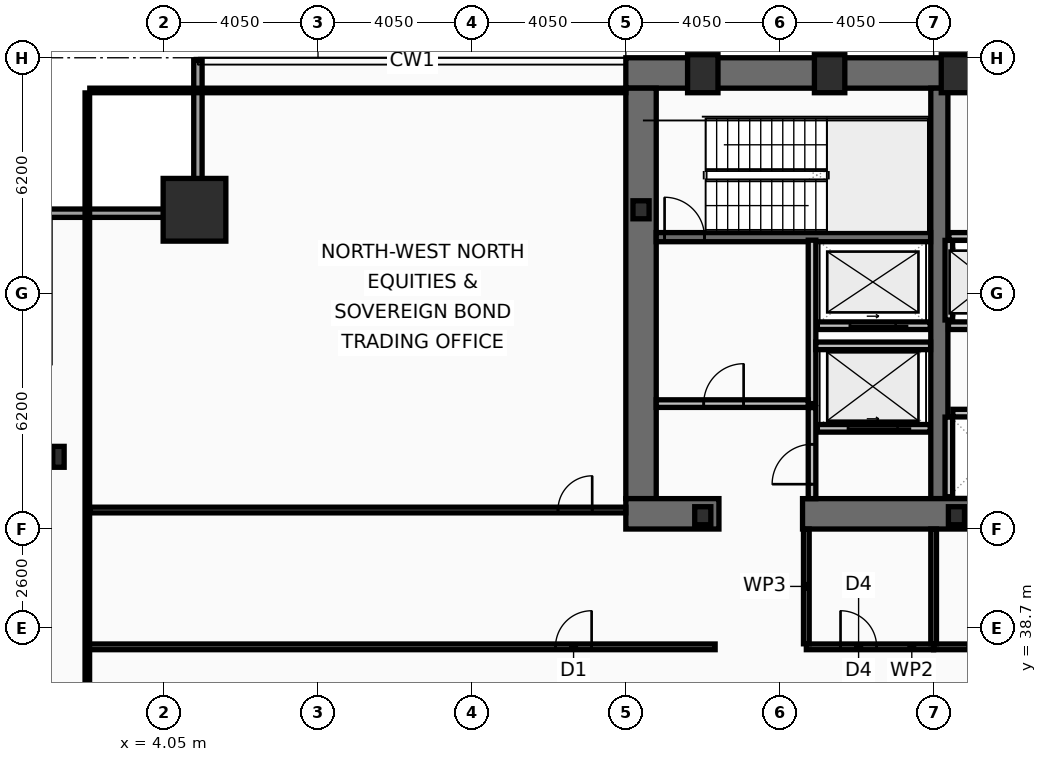
"""IFC4 building model, lengths in metres.
Left out: names, types, materials, properties, quantities, classifications, styles, units other than length and angle.
Written with IfcOpenShell. Run it as: python <this file> out.ifc"""

import sys

from ifc_helpers import new_model, si_unit, direction, frame, frame_2d, origin, origin_2d, place, context, subcontext, project, spatial, rectangle, hollow_rectangle, i_section, extrude, element, fill, save


model = new_model("IFC4")
c1 = context("Model", 3, precision=1e-05, world=origin(), true_north=direction((0.0, 1.0)))
c2 = subcontext(c1, "Body", "Model", "MODEL_VIEW")
j1 = project(units=[si_unit("LENGTHUNIT", "METRE"), si_unit("PLANEANGLEUNIT", "RADIAN")], contexts=[c1])
p1 = place(None, origin())
s1 = spatial("IfcSite", under=j1, at=p1, CompositionType="ELEMENT")
p2 = place(p1, origin())
s2 = spatial("IfcBuilding", under=s1, at=p2, CompositionType="ELEMENT")
p3 = place(p2, frame((0.0, 0.0, 25.8)))
s3 = spatial("IfcBuildingStorey", under=s2, at=p3, CompositionType="ELEMENT", Elevation=25.8)
p4 = place(p3, frame((16.2, 53.3, 0.0), z_axis=(0.0, 0.0, 1.0), x_axis=(1.0, 0.0, 0.0)))
e1 = element("IfcWall", 1, at=p4, inside=s3, PredefinedType="SHEAR", context=c2, shape_type="SweptSolid", body=[
    extrude(rectangle(XDim=40.5, YDim=0.8, at=frame_2d((20.25, 0.0))), origin(), (0.0, 0.0, 1.0), 3.82),
])
p5 = place(p3, frame((16.6, 42.1, 0.0), z_axis=(0.0, 0.0, 1.0), x_axis=(0.0, 1.0, 0.0)))
e2 = element("IfcWall", 2, at=p5, inside=s3, PredefinedType="SHEAR", context=c2, shape_type="SweptSolid", body=[
    extrude(rectangle(XDim=10.8, YDim=0.8, at=frame_2d((5.4, 0.0))), origin(), (0.0, 0.0, 1.0), 3.82),
])
p6 = place(p3, frame((24.45, 42.1, 0.0), z_axis=(0.0, 0.0, 1.0), x_axis=(0.0, 1.0, 0.0)))
e3 = element("IfcWall", 3, at=p6, inside=s3, PredefinedType="SHEAR", context=c2, shape_type="SweptSolid", body=[
    extrude(rectangle(XDim=10.8, YDim=0.45, at=frame_2d((5.4, 0.0))), origin(), (0.0, 0.0, 1.0), 3.82),
])
p7 = place(p3, frame((18.65, 41.7, 0.0), z_axis=(0.0, 0.0, 1.0), x_axis=(-1.0, 0.0, 0.0)))
e4 = element("IfcWall", 4, at=p7, inside=s3, PredefinedType="SHEAR", context=c2, shape_type="SweptSolid", body=[
    extrude(rectangle(XDim=2.45, YDim=0.8, at=frame_2d((1.225, 0.0))), origin(), (0.0, 0.0, 1.0), 3.82),
])
p8 = place(p3, frame((32.3, 41.7, 0.0), z_axis=(0.0, 0.0, 1.0), x_axis=(-1.0, 0.0, 0.0)))
e5 = element("IfcWall", 5, at=p8, inside=s3, PredefinedType="SHEAR", context=c2, shape_type="SweptSolid", body=[
    extrude(rectangle(XDim=11.45, YDim=0.8, at=frame_2d((5.725, 0.0))), origin(), (0.0, 0.0, 1.0), 3.82),
])
p9 = place(p3, frame((17.0, 48.98, 0.0), z_axis=(0.0, 0.0, 1.0), x_axis=(1.0, 0.0, 0.0)))
e6 = element("IfcWall", 6, at=p9, inside=s3, PredefinedType="SHEAR", context=c2, shape_type="SweptSolid", body=[
    extrude(rectangle(XDim=7.22, YDim=0.24, at=frame_2d((3.61, 0.0))), origin(), (0.0, 0.0, 1.0), 3.82),
])
p10 = place(p9, frame((0.22, 0.0, 0.0)))
e7 = element("IfcOpeningElement", 7, at=p10, cuts=e6, PredefinedType="OPENING", context=c2, shape_type="SweptSolid", body=[
    extrude(rectangle(XDim=1.05, YDim=2.15, at=frame_2d((0.525, 1.075))), frame((0.0, 0.13, 0.0), z_axis=(0.0, -1.0, 0.0), x_axis=(1.0, 0.0, 0.0)), (0.0, 0.0, 1.0), 0.26),
])
p11 = place(p3, frame((4.85, 49.7, 0.0), z_axis=(0.0, 0.0, 1.0), x_axis=(1.0, 0.0, 0.0)))
e8 = element("IfcColumn", 8, at=p11, inside=s3, PredefinedType="COLUMN", context=c2, shape_type="SweptSolid", body=[
    extrude(hollow_rectangle(XDim=1.65, YDim=1.65, WallThickness=0.075, at=origin_2d()), origin(), (0.0, 0.0, 1.0), 4.0),
])
for number, where, z_axis, x_axis in (
    (9, (18.225, 53.28, 0.0), (0.0, 0.0, 1.0), (1.0, 0.0, 0.0)),
    (10, (21.562, 53.28, 0.0), (0.0, 0.0, 1.0), (1.0, 0.0, 0.0)),
    (11, (24.9, 53.28, 0.0), (0.0, 0.0, 1.0), (1.0, 0.0, 0.0)),
):
    element("IfcColumn", number, at=place(p3, frame(where, z_axis=z_axis, x_axis=x_axis)), inside=s3, PredefinedType="COLUMN", context=c2, shape_type="SweptSolid", body=[
        extrude(hollow_rectangle(XDim=0.8, YDim=1.0, WallThickness=0.055, at=origin_2d()), origin(), (0.0, 0.0, 1.0), 4.0),
    ])
p12 = place(p3, frame((1.27, 43.2, 0.0), z_axis=(0.0, 0.0, 1.0), x_axis=(1.0, 0.0, 0.0)))
e12 = element("IfcColumn", 12, at=p12, inside=s3, PredefinedType="COLUMN", context=c2, shape_type="SweptSolid", body=[
    extrude(i_section(OverallWidth=0.3, OverallDepth=0.55, WebThickness=0.015, FlangeThickness=0.029, at=origin_2d()), origin(), (0.0, 0.0, 1.0), 4.0),
])
for number, where, z_axis, x_axis in (
    (13, (16.6, 49.7, 0.0), (0.0, 0.0, 1.0), (1.0, 0.0, 0.0)),
    (14, (18.225, 41.65, 0.0), (0.0, 0.0, 1.0), (1.0, 0.0, 0.0)),
    (15, (24.9, 41.65, 0.0), (0.0, 0.0, 1.0), (1.0, 0.0, 0.0)),
):
    element("IfcColumn", number, at=place(p3, frame(where, z_axis=z_axis, x_axis=x_axis)), inside=s3, PredefinedType="COLUMN", context=c2, shape_type="SweptSolid", body=[
        extrude(i_section(OverallWidth=0.424, OverallDepth=0.474, WebThickness=0.048, FlangeThickness=0.077, at=origin_2d()), origin(), (0.0, 0.0, 1.0), 4.0),
    ])
p13 = place(p3, frame((0.83, 49.61, 0.0), z_axis=(0.0, 0.0, 1.0), x_axis=(1.0, 0.0, 0.0)))
e16 = element("IfcWall", 16, at=p13, inside=s3, PredefinedType="SOLIDWALL", context=c2, shape_type="SweptSolid", body=[
    extrude(rectangle(XDim=4.22, YDim=0.22, at=frame_2d((2.11, 0.0))), origin(), (0.0, 0.0, 1.0), 3.16),
])
p14 = place(p3, frame((4.94, 49.72, 0.0), z_axis=(0.0, 0.0, 1.0), x_axis=(0.0, 1.0, 0.0)))
e17 = element("IfcWall", 17, at=p14, inside=s3, PredefinedType="SOLIDWALL", context=c2, shape_type="SweptSolid", body=[
    extrude(rectangle(XDim=3.91, YDim=0.22, at=frame_2d((1.955, 0.0))), origin(), (0.0, 0.0, 1.0), 3.16),
])
p15 = place(p3, frame((24.21, 43.95, 0.0), z_axis=(0.0, 0.0, 1.0), x_axis=(-1.0, 0.0, 0.0)))
e18 = element("IfcWall", 18, at=p15, inside=s3, PredefinedType="PARTITIONING", context=c2, shape_type="SweptSolid", body=[
    extrude(rectangle(XDim=2.97, YDim=0.2, at=frame_2d((1.485, 0.0))), origin(), (0.0, 0.0, 1.0), 3.82),
])
p16 = place(p15, frame((0.86, 0.0, 0.0)))
e19 = element("IfcOpeningElement", 19, at=p16, cuts=e18, PredefinedType="OPENING", context=c2, shape_type="SweptSolid", body=[
    extrude(rectangle(XDim=1.3, YDim=2.18, at=frame_2d((0.65, 1.09))), frame((0.0, 0.11, 0.0), z_axis=(0.0, -1.0, 0.0), x_axis=(1.0, 0.0, 0.0)), (0.0, 0.0, 1.0), 0.22),
])
p17 = place(p3, frame((24.21, 46.65, 0.0), z_axis=(0.0, 0.0, 1.0), x_axis=(-1.0, 0.0, 0.0)))
e20 = element("IfcWall", 20, at=p17, inside=s3, PredefinedType="PARTITIONING", context=c2, shape_type="SweptSolid", body=[
    extrude(rectangle(XDim=2.97, YDim=0.2, at=frame_2d((1.485, 0.0))), origin(), (0.0, 0.0, 1.0), 3.82),
])
p18 = place(p17, frame((0.91, 0.0, 0.0)))
e21 = element("IfcOpeningElement", 21, at=p18, cuts=e20, PredefinedType="OPENING", context=c2, shape_type="SweptSolid", body=[
    extrude(rectangle(XDim=1.2, YDim=2.18, at=frame_2d((0.6, 1.09))), frame((0.0, 0.11, 0.0), z_axis=(0.0, -1.0, 0.0), x_axis=(1.0, 0.0, 0.0)), (0.0, 0.0, 1.0), 0.22),
])
p19 = place(p3, frame((31.22, 46.65, 0.0), z_axis=(0.0, 0.0, 1.0), x_axis=(-1.0, 0.0, 0.0)))
e22 = element("IfcWall", 22, at=p19, inside=s3, PredefinedType="PARTITIONING", context=c2, shape_type="SweptSolid", body=[
    extrude(rectangle(XDim=6.53, YDim=0.2, at=frame_2d((3.265, 0.0))), origin(), (0.0, 0.0, 1.0), 3.82),
])
p20 = place(p19, frame((4.9, 0.0, 0.0)))
e23 = element("IfcOpeningElement", 23, at=p20, cuts=e22, PredefinedType="OPENING", context=c2, shape_type="SweptSolid", body=[
    extrude(rectangle(XDim=1.1, YDim=2.18, at=frame_2d((0.55, 1.09))), frame((0.0, 0.11, 0.0), z_axis=(0.0, -1.0, 0.0), x_axis=(1.0, 0.0, 0.0)), (0.0, 0.0, 1.0), 0.22),
])
p21 = place(p19, frame((2.74, 0.0, 0.0)))
e24 = element("IfcOpeningElement", 24, at=p21, cuts=e22, PredefinedType="OPENING", context=c2, shape_type="SweptSolid", body=[
    extrude(rectangle(XDim=1.1, YDim=2.18, at=frame_2d((0.55, 1.09))), frame((0.0, 0.11, 0.0), z_axis=(0.0, -1.0, 0.0), x_axis=(1.0, 0.0, 0.0)), (0.0, 0.0, 1.0), 0.22),
])
p22 = place(p19, frame((0.58, 0.0, 0.0)))
e25 = element("IfcOpeningElement", 25, at=p22, cuts=e22, PredefinedType="OPENING", context=c2, shape_type="SweptSolid", body=[
    extrude(rectangle(XDim=1.1, YDim=2.18, at=frame_2d((0.55, 1.09))), frame((0.0, 0.11, 0.0), z_axis=(0.0, -1.0, 0.0), x_axis=(1.0, 0.0, 0.0)), (0.0, 0.0, 1.0), 0.22),
])
p23 = place(p3, frame((21.1, 44.6, 0.0), z_axis=(0.0, 0.0, 1.0), x_axis=(0.0, 1.0, 0.0)))
e26 = element("IfcWall", 26, at=p23, inside=s3, PredefinedType="PARTITIONING", context=c2, shape_type="SweptSolid", body=[
    extrude(rectangle(XDim=4.3, YDim=0.2, at=frame_2d((2.15, 0.0))), origin(), (0.0, 0.0, 1.0), 3.82),
])
p24 = place(p3, frame((17.0, 44.6, 0.0), z_axis=(0.0, 0.0, 1.0), x_axis=(1.0, 0.0, 0.0)))
e27 = element("IfcWall", 27, at=p24, inside=s3, PredefinedType="PARTITIONING", context=c2, shape_type="SweptSolid", body=[
    extrude(rectangle(XDim=4.0, YDim=0.2, at=frame_2d((2.0, 0.0))), origin(), (0.0, 0.0, 1.0), 3.82),
])
p25 = place(p24, frame((1.25, 0.0, 0.0)))
e28 = element("IfcOpeningElement", 28, at=p25, cuts=e27, PredefinedType="OPENING", context=c2, shape_type="SweptSolid", body=[
    extrude(rectangle(XDim=1.05, YDim=2.15, at=frame_2d((0.525, 1.075))), frame((0.0, 0.11, 0.0), z_axis=(0.0, -1.0, 0.0), x_axis=(1.0, 0.0, 0.0)), (0.0, 0.0, 1.0), 0.22),
])
p26 = place(p3, frame((21.2, 46.12, 0.0), z_axis=(0.0, 0.0, 1.0), x_axis=(1.0, 0.0, 0.0)))
e29 = element("IfcWall", 29, at=p26, inside=s3, PredefinedType="PARTITIONING", context=c2, shape_type="SweptSolid", body=[
    extrude(rectangle(XDim=3.02, YDim=0.2, at=frame_2d((1.51, 0.0))), origin(), (0.0, 0.0, 1.0), 3.82),
])
p27 = place(p3, frame((21.1, 42.1, 0.0), z_axis=(0.0, 0.0, 1.0), x_axis=(0.0, 1.0, 0.0)))
e30 = element("IfcWall", 30, at=p27, inside=s3, PredefinedType="PARTITIONING", context=c2, shape_type="SweptSolid", body=[
    extrude(rectangle(XDim=2.395, YDim=0.2, at=frame_2d((1.198, 0.0))), origin(), (0.0, 0.0, 1.0), 3.82),
])
p28 = place(p27, frame((0.38, 0.0, 0.0)))
e31 = element("IfcOpeningElement", 31, at=p28, cuts=e30, PredefinedType="OPENING", context=c2, shape_type="SweptSolid", body=[
    extrude(rectangle(XDim=1.05, YDim=2.15, at=frame_2d((0.525, 1.075))), frame((0.0, 0.11, 0.0), z_axis=(0.0, -1.0, 0.0), x_axis=(1.0, 0.0, 0.0)), (0.0, 0.0, 1.0), 0.22),
])
p29 = place(p3, frame((24.7, 46.8, 0.0), z_axis=(0.0, 0.0, 1.0), x_axis=(0.0, 1.0, 0.0)))
e32 = element("IfcWall", 32, at=p29, inside=s3, PredefinedType="PARTITIONING", context=c2, shape_type="SweptSolid", body=[
    extrude(rectangle(XDim=2.095, YDim=0.2, at=frame_2d((1.047, 0.0))), origin(), (0.0, 0.0, 1.0), 3.82),
])
p30 = place(p3, frame((24.805, 44.35, 0.0), z_axis=(0.0, 0.0, 1.0), x_axis=(1.0, 0.0, 0.0)))
e33 = element("IfcWall", 33, at=p30, inside=s3, PredefinedType="PARTITIONING", context=c2, shape_type="SweptSolid", body=[
    extrude(rectangle(XDim=6.27, YDim=0.2, at=frame_2d((3.135, 0.0))), origin(), (0.0, 0.0, 1.0), 3.82),
])
p31 = place(p3, frame((24.7, 42.15, 0.0), z_axis=(0.0, 0.0, 1.0), x_axis=(0.0, 1.0, 0.0)))
e34 = element("IfcWall", 34, at=p31, inside=s3, PredefinedType="PARTITIONING", context=c2, shape_type="SweptSolid", body=[
    extrude(rectangle(XDim=2.095, YDim=0.2, at=frame_2d((1.048, 0.0))), origin(), (0.0, 0.0, 1.0), 3.82),
])
p32 = place(p3, frame((24.7, 52.86, 0.0), z_axis=(0.0, 0.0, 1.0), x_axis=(1.0, 0.0, 0.0)))
e35 = element("IfcWall", 35, at=p32, inside=s3, PredefinedType="PARTITIONING", context=c2, shape_type="SweptSolid", body=[
    extrude(rectangle(XDim=7.72, YDim=0.12, at=frame_2d((3.86, 0.0))), origin(), (0.0, 0.0, 1.0), 3.82),
])
p33 = place(p3, frame((24.7, 49.0, 0.0), z_axis=(0.0, 0.0, 1.0), x_axis=(1.0, 0.0, 0.0)))
e36 = element("IfcWall", 36, at=p33, inside=s3, PredefinedType="PARTITIONING", context=c2, shape_type="SweptSolid", body=[
    extrude(rectangle(XDim=7.72, YDim=0.2, at=frame_2d((3.86, 0.0))), origin(), (0.0, 0.0, 1.0), 3.82),
])
p34 = place(p33, frame((6.56, 0.0, 0.0)))
e37 = element("IfcOpeningElement", 37, at=p34, cuts=e36, PredefinedType="OPENING", context=c2, shape_type="SweptSolid", body=[
    extrude(rectangle(XDim=0.95, YDim=2.1, at=frame_2d((0.475, 1.05))), frame((0.0, 0.11, 0.0), z_axis=(0.0, -1.0, 0.0), x_axis=(1.0, 0.0, 0.0)), (0.0, 0.0, 1.0), 0.22),
])
p35 = place(p3, frame((20.95, 38.2, 0.0), z_axis=(0.0, 0.0, 1.0), x_axis=(1.0, 0.0, 0.0)))
e38 = element("IfcWall", 38, at=p35, inside=s3, PredefinedType="PARTITIONING", context=c2, shape_type="SweptSolid", body=[
    extrude(rectangle(XDim=3.35, YDim=0.15, at=frame_2d((1.675, 0.0))), origin(), (0.0, 0.0, 1.0), 3.82),
])
p36 = place(p35, frame((0.9, 0.0, 0.0)))
e39 = element("IfcOpeningElement", 39, at=p36, cuts=e38, PredefinedType="OPENING", context=c2, shape_type="SweptSolid", body=[
    extrude(rectangle(XDim=0.95, YDim=2.05, at=frame_2d((0.475, 1.025))), frame((0.0, 0.085, 0.0), z_axis=(0.0, -1.0, 0.0), x_axis=(1.0, 0.0, 0.0)), (0.0, 0.0, 1.0), 0.17),
])
p37 = place(p3, frame((24.3, 38.2, 0.0), z_axis=(0.0, 0.0, 1.0), x_axis=(1.0, 0.0, 0.0)))
e40 = element("IfcWall", 40, at=p37, inside=s3, PredefinedType="PARTITIONING", context=c2, shape_type="SweptSolid", body=[
    extrude(rectangle(XDim=4.1, YDim=0.15, at=frame_2d((2.05, 0.0))), origin(), (0.0, 0.0, 1.0), 3.01),
])
p38 = place(p37, frame((0.9, 0.0, 0.0)))
e41 = element("IfcOpeningElement", 41, at=p38, cuts=e40, PredefinedType="OPENING", context=c2, shape_type="SweptSolid", body=[
    extrude(rectangle(XDim=0.95, YDim=2.05, at=frame_2d((0.475, 1.025))), frame((0.0, 0.085, 0.0), z_axis=(0.0, -1.0, 0.0), x_axis=(1.0, 0.0, 0.0)), (0.0, 0.0, 1.0), 0.17),
])
for number, where, z_axis, x_axis in (
    (42, (20.95, 38.28, 0.0), (0.0, 0.0, 1.0), (0.0, 1.0, 0.0)),
    (43, (24.3, 38.28, 0.0), (0.0, 0.0, 1.0), (0.0, 1.0, 0.0)),
):
    element("IfcWall", number, at=place(p3, frame(where, z_axis=z_axis, x_axis=x_axis)), inside=s3, PredefinedType="PARTITIONING", context=c2, shape_type="SweptSolid", body=[
        extrude(rectangle(XDim=3.02, YDim=0.15, at=frame_2d((1.51, 0.0))), origin(), (0.0, 0.0, 1.0), 3.82),
    ])
p39 = place(p3, frame((2.03, 38.2, 0.0), z_axis=(0.0, 0.0, 1.0), x_axis=(1.0, 0.0, 0.0)))
e44 = element("IfcWall", 44, at=p39, inside=s3, PredefinedType="PARTITIONING", context=c2, shape_type="SweptSolid", body=[
    extrude(rectangle(XDim=16.52, YDim=0.15, at=frame_2d((8.26, 0.0))), origin(), (0.0, 0.0, 1.0), 3.01),
])
p40 = place(p39, frame((12.32, 0.0, 0.0)))
e45 = element("IfcOpeningElement", 45, at=p40, cuts=e44, PredefinedType="OPENING", context=c2, shape_type="SweptSolid", body=[
    extrude(rectangle(XDim=0.95, YDim=2.05, at=frame_2d((0.475, 1.025))), frame((0.0, 0.085, 0.0), z_axis=(0.0, -1.0, 0.0), x_axis=(1.0, 0.0, 0.0)), (0.0, 0.0, 1.0), 0.17),
])
p41 = place(p3, frame((2.095, 41.8, 0.0), z_axis=(0.0, 0.0, 1.0), x_axis=(1.0, 0.0, 0.0)))
e46 = element("IfcWall", 46, at=p41, inside=s3, PredefinedType="PARTITIONING", context=c2, shape_type="SweptSolid", body=[
    extrude(rectangle(XDim=14.105, YDim=0.15, at=frame_2d((7.052, 0.0))), origin(), (0.0, 0.0, 1.0), 3.82),
])
p42 = place(p41, frame((12.32, 0.0, 0.0)))
e47 = element("IfcOpeningElement", 47, at=p42, cuts=e46, PredefinedType="OPENING", context=c2, shape_type="SweptSolid", body=[
    extrude(rectangle(XDim=0.9, YDim=2.05, at=frame_2d((0.45, 1.025))), frame((0.0, 0.085, 0.0), z_axis=(0.0, -1.0, 0.0), x_axis=(1.0, 0.0, 0.0)), (0.0, 0.0, 1.0), 0.17),
])
p43 = place(p3, frame((2.03, 10.665, 0.0), z_axis=(0.0, 0.0, 1.0), x_axis=(0.0, 1.0, 0.0)))
e48 = element("IfcWall", 48, at=p43, inside=s3, PredefinedType="PARTITIONING", context=c2, shape_type="SweptSolid", body=[
    extrude(rectangle(XDim=42.11, YDim=0.12, at=frame_2d((21.055, 0.0))), origin(), (0.0, 0.0, 1.0), 3.01),
])
p44 = place(p3, frame((2.095, 52.84, 0.0), z_axis=(0.0, 0.0, 1.0), x_axis=(1.0, 0.0, 0.0)))
e49 = element("IfcWall", 49, at=p44, inside=s3, PredefinedType="PARTITIONING", context=c2, shape_type="SweptSolid", body=[
    extrude(rectangle(XDim=14.105, YDim=0.12, at=frame_2d((7.052, 0.0))), origin(), (0.0, 0.0, 1.0), 3.82),
])
p45 = place(p10, origin())
e50 = element("IfcDoor", 50, at=p45, inside=s3, OperationType="SINGLE_SWING_LEFT", PredefinedType="DOOR", context=c2, shape_type="SweptSolid", body=[
    extrude(rectangle(XDim=1.05, YDim=2.15, at=frame_2d((0.525, 1.075))), frame((0.0, 0.025, 0.0), z_axis=(0.0, -1.0, 0.0), x_axis=(1.0, 0.0, 0.0)), (0.0, 0.0, 1.0), 0.05),
])
fill(e7, e50)
p46 = place(p16, origin())
e51 = element("IfcDoor", 51, at=p46, inside=s3, OperationType="SLIDING_TO_LEFT", PredefinedType="DOOR", context=c2, shape_type="SweptSolid", body=[
    extrude(rectangle(XDim=1.3, YDim=2.18, at=frame_2d((0.65, 1.09))), frame((0.0, 0.025, 0.0), z_axis=(0.0, -1.0, 0.0), x_axis=(1.0, 0.0, 0.0)), (0.0, 0.0, 1.0), 0.05),
])
fill(e19, e51)
p47 = place(p18, origin())
e52 = element("IfcDoor", 52, at=p47, inside=s3, OperationType="SLIDING_TO_LEFT", PredefinedType="DOOR", context=c2, shape_type="SweptSolid", body=[
    extrude(rectangle(XDim=1.2, YDim=2.18, at=frame_2d((0.6, 1.09))), frame((0.0, 0.025, 0.0), z_axis=(0.0, -1.0, 0.0), x_axis=(1.0, 0.0, 0.0)), (0.0, 0.0, 1.0), 0.05),
])
fill(e21, e52)
p48 = place(p25, origin())
e53 = element("IfcDoor", 53, at=p48, inside=s3, OperationType="SINGLE_SWING_RIGHT", PredefinedType="DOOR", context=c2, shape_type="SweptSolid", body=[
    extrude(rectangle(XDim=1.05, YDim=2.15, at=frame_2d((0.525, 1.075))), frame((0.0, 0.025, 0.0), z_axis=(0.0, -1.0, 0.0), x_axis=(1.0, 0.0, 0.0)), (0.0, 0.0, 1.0), 0.05),
])
fill(e28, e53)
p49 = place(p28, origin())
e54 = element("IfcDoor", 54, at=p49, inside=s3, OperationType="SINGLE_SWING_LEFT", PredefinedType="DOOR", context=c2, shape_type="SweptSolid", body=[
    extrude(rectangle(XDim=1.05, YDim=2.15, at=frame_2d((0.525, 1.075))), frame((0.0, 0.025, 0.0), z_axis=(0.0, -1.0, 0.0), x_axis=(1.0, 0.0, 0.0)), (0.0, 0.0, 1.0), 0.05),
])
fill(e31, e54)
p50 = place(p36, origin())
e55 = element("IfcDoor", 55, at=p50, inside=s3, OperationType="SINGLE_SWING_LEFT", PredefinedType="DOOR", context=c2, shape_type="SweptSolid", body=[
    extrude(rectangle(XDim=0.95, YDim=2.05, at=frame_2d((0.475, 1.025))), frame((0.0, 0.025, 0.0), z_axis=(0.0, -1.0, 0.0), x_axis=(1.0, 0.0, 0.0)), (0.0, 0.0, 1.0), 0.05),
])
fill(e39, e55)
p51 = place(p40, origin())
e56 = element("IfcDoor", 56, at=p51, inside=s3, OperationType="SINGLE_SWING_RIGHT", PredefinedType="DOOR", context=c2, shape_type="SweptSolid", body=[
    extrude(rectangle(XDim=0.95, YDim=2.05, at=frame_2d((0.475, 1.025))), frame((0.0, 0.025, 0.0), z_axis=(0.0, -1.0, 0.0), x_axis=(1.0, 0.0, 0.0)), (0.0, 0.0, 1.0), 0.05),
])
fill(e45, e56)
p52 = place(p42, origin())
e57 = element("IfcDoor", 57, at=p52, inside=s3, OperationType="SINGLE_SWING_RIGHT", PredefinedType="DOOR", context=c2, shape_type="SweptSolid", body=[
    extrude(rectangle(XDim=0.9, YDim=2.05, at=frame_2d((0.45, 1.025))), frame((0.0, 0.025, 0.0), z_axis=(0.0, -1.0, 0.0), x_axis=(1.0, 0.0, 0.0)), (0.0, 0.0, 1.0), 0.05),
])
fill(e47, e57)
save(model, sys.argv[1])
